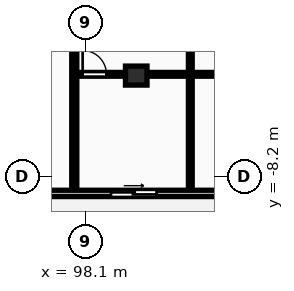
"""IFC4 building model, lengths in metres.
Left out: names, types, materials, properties, quantities, classifications, styles, units other than length and angle.
Written with IfcOpenShell. Run it as: python <this file> out.ifc"""

import sys

from ifc_helpers import new_model, si_unit, direction, frame, frame_2d, origin, origin_2d, place, context, subcontext, project, spatial, rectangle, extrude, element, fill, save


model = new_model("IFC4")
c1 = context("Model", 3, precision=1e-05, world=origin(), true_north=direction((0.0, 1.0)))
c2 = subcontext(c1, "Body", "Model", "MODEL_VIEW")
j1 = project(units=[si_unit("LENGTHUNIT", "METRE"), si_unit("PLANEANGLEUNIT", "RADIAN")], contexts=[c1])
p1 = place(None, origin())
s1 = spatial("IfcSite", under=j1, at=p1, CompositionType="ELEMENT")
p2 = place(p1, origin())
s2 = spatial("IfcBuilding", under=s1, at=p2, CompositionType="ELEMENT")
p3 = place(p2, frame((0.0, 0.0, 126.3)))
s3 = spatial("IfcBuildingStorey", under=s2, at=p3, CompositionType="ELEMENT", Elevation=126.3)
p4 = place(p3, frame((100.1, -4.2, 0.0), z_axis=(0.0, 0.0, 1.0), x_axis=(1.0, 0.0, 0.0)))
e1 = element("IfcColumn", 1, at=p4, inside=s3, PredefinedType="COLUMN", context=c2, shape_type="SweptSolid", body=[
    extrude(rectangle(XDim=0.85, YDim=0.75, at=origin_2d()), origin(), (0.0, 0.0, 1.0), 3.25),
])
p5 = place(p3, frame((72.7, -8.85, 0.0), z_axis=(0.0, 0.0, 1.0), x_axis=(1.0, 0.0, 0.0)))
e2 = element("IfcWall", 2, at=p5, inside=s3, PredefinedType="STANDARD", context=c2, shape_type="SweptSolid", body=[
    extrude(rectangle(XDim=58.0, YDim=0.25, at=frame_2d((29.0, 0.0))), origin(), (0.0, 0.0, 1.0), 2.97),
])
p6 = place(p5, frame((5.77, 0.0, 0.85)))
e3 = element("IfcOpeningElement", 3, at=p6, cuts=e2, PredefinedType="OPENING", context=c2, shape_type="SweptSolid", body=[
    extrude(rectangle(XDim=2.4, YDim=1.9, at=frame_2d((1.2, 0.95))), frame((0.0, 0.135, 0.0), z_axis=(0.0, -1.0, 0.0), x_axis=(1.0, 0.0, 0.0)), (0.0, 0.0, 1.0), 0.27),
])
p7 = place(p5, frame((10.97, 0.0, 0.85)))
e4 = element("IfcOpeningElement", 4, at=p7, cuts=e2, PredefinedType="OPENING", context=c2, shape_type="SweptSolid", body=[
    extrude(rectangle(XDim=2.4, YDim=1.9, at=frame_2d((1.2, 0.95))), frame((0.0, 0.135, 0.0), z_axis=(0.0, -1.0, 0.0), x_axis=(1.0, 0.0, 0.0)), (0.0, 0.0, 1.0), 0.27),
])
p8 = place(p5, frame((16.387, 0.0, 0.85)))
e5 = element("IfcOpeningElement", 5, at=p8, cuts=e2, PredefinedType="OPENING", context=c2, shape_type="SweptSolid", body=[
    extrude(rectangle(XDim=2.4, YDim=1.9, at=frame_2d((1.2, 0.95))), frame((0.0, 0.135, 0.0), z_axis=(0.0, -1.0, 0.0), x_axis=(1.0, 0.0, 0.0)), (0.0, 0.0, 1.0), 0.27),
])
p9 = place(p5, frame((1.345, 0.0, 0.0)))
e6 = element("IfcOpeningElement", 6, at=p9, cuts=e2, PredefinedType="OPENING", context=c2, shape_type="SweptSolid", body=[
    extrude(rectangle(XDim=1.8, YDim=2.2, at=frame_2d((0.9, 1.1))), frame((0.0, 0.135, 0.0), z_axis=(0.0, -1.0, 0.0), x_axis=(1.0, 0.0, 0.0)), (0.0, 0.0, 1.0), 0.27),
])
p10 = place(p5, frame((21.419, 0.0, 0.85)))
e7 = element("IfcOpeningElement", 7, at=p10, cuts=e2, PredefinedType="OPENING", context=c2, shape_type="SweptSolid", body=[
    extrude(rectangle(XDim=2.4, YDim=1.9, at=frame_2d((1.2, 0.95))), frame((0.0, 0.135, 0.0), z_axis=(0.0, -1.0, 0.0), x_axis=(1.0, 0.0, 0.0)), (0.0, 0.0, 1.0), 0.27),
])
p11 = place(p5, frame((30.827, 0.0, 0.85)))
e8 = element("IfcOpeningElement", 8, at=p11, cuts=e2, PredefinedType="OPENING", context=c2, shape_type="SweptSolid", body=[
    extrude(rectangle(XDim=2.4, YDim=1.9, at=frame_2d((1.2, 0.95))), frame((0.0, 0.135, 0.0), z_axis=(0.0, -1.0, 0.0), x_axis=(1.0, 0.0, 0.0)), (0.0, 0.0, 1.0), 0.27),
])
p12 = place(p5, frame((35.688, 0.0, 0.85)))
e9 = element("IfcOpeningElement", 9, at=p12, cuts=e2, PredefinedType="OPENING", context=c2, shape_type="SweptSolid", body=[
    extrude(rectangle(XDim=2.4, YDim=1.9, at=frame_2d((1.2, 0.95))), frame((0.0, 0.135, 0.0), z_axis=(0.0, -1.0, 0.0), x_axis=(1.0, 0.0, 0.0)), (0.0, 0.0, 1.0), 0.27),
])
p13 = place(p5, frame((26.405, 0.0, 0.0)))
e10 = element("IfcOpeningElement", 10, at=p13, cuts=e2, PredefinedType="OPENING", context=c2, shape_type="SweptSolid", body=[
    extrude(rectangle(XDim=1.8, YDim=2.2, at=frame_2d((0.9, 1.1))), frame((0.0, 0.135, 0.0), z_axis=(0.0, -1.0, 0.0), x_axis=(1.0, 0.0, 0.0)), (0.0, 0.0, 1.0), 0.27),
])
p14 = place(p5, frame((40.161, 0.0, 0.85)))
e11 = element("IfcOpeningElement", 11, at=p14, cuts=e2, PredefinedType="OPENING", context=c2, shape_type="SweptSolid", body=[
    extrude(rectangle(XDim=2.4, YDim=1.9, at=frame_2d((1.2, 0.95))), frame((0.0, 0.135, 0.0), z_axis=(0.0, -1.0, 0.0), x_axis=(1.0, 0.0, 0.0)), (0.0, 0.0, 1.0), 0.27),
])
p15 = place(p5, frame((48.113, 0.0, 0.0)))
e12 = element("IfcOpeningElement", 12, at=p15, cuts=e2, PredefinedType="OPENING", context=c2, shape_type="SweptSolid", body=[
    extrude(rectangle(XDim=1.8, YDim=2.2, at=frame_2d((0.9, 1.1))), frame((0.0, 0.135, 0.0), z_axis=(0.0, -1.0, 0.0), x_axis=(1.0, 0.0, 0.0)), (0.0, 0.0, 1.0), 0.27),
])
p16 = place(p5, frame((54.9, 0.0, 0.85)))
e13 = element("IfcOpeningElement", 13, at=p16, cuts=e2, PredefinedType="OPENING", context=c2, shape_type="SweptSolid", body=[
    extrude(rectangle(XDim=2.4, YDim=1.9, at=frame_2d((1.2, 0.95))), frame((0.0, 0.135, 0.0), z_axis=(0.0, -1.0, 0.0), x_axis=(1.0, 0.0, 0.0)), (0.0, 0.0, 1.0), 0.27),
])
p17 = place(p3, frame((97.655, -8.7, 0.0), z_axis=(0.0, 0.0, 1.0), x_axis=(0.0, 1.0, 0.0)))
e14 = element("IfcWall", 14, at=p17, inside=s3, PredefinedType="PARTITIONING", context=c2, shape_type="SweptSolid", body=[
    extrude(rectangle(XDim=24.57, YDim=0.2, at=frame_2d((12.285, 0.0))), origin(), (0.0, 0.0, 1.0), 2.97),
])
p18 = place(p3, frame((102.235, -8.7, 0.0), z_axis=(0.0, 0.0, 1.0), x_axis=(0.0, 1.0, 0.0)))
e15 = element("IfcWall", 15, at=p18, inside=s3, PredefinedType="PARTITIONING", context=c2, shape_type="SweptSolid", body=[
    extrude(rectangle(XDim=9.61, YDim=0.15, at=frame_2d((4.805, 0.0))), origin(), (0.0, 0.0, 1.0), 2.97),
])
p19 = place(p18, frame((5.92, 0.0, 0.0)))
e16 = element("IfcOpeningElement", 16, at=p19, cuts=e15, PredefinedType="OPENING", context=c2, shape_type="SweptSolid", body=[
    extrude(rectangle(XDim=0.92, YDim=2.08, at=frame_2d((0.46, 1.04))), frame((0.0, 0.085, 0.0), z_axis=(0.0, -1.0, 0.0), x_axis=(1.0, 0.0, 0.0)), (0.0, 0.0, 1.0), 0.17),
])
p20 = place(p3, frame((97.735, -4.15, 0.0), z_axis=(0.0, 0.0, 1.0), x_axis=(1.0, 0.0, 0.0)))
e17 = element("IfcWall", 17, at=p20, inside=s3, PredefinedType="PARTITIONING", context=c2, shape_type="SweptSolid", body=[
    extrude(rectangle(XDim=14.222, YDim=0.15, at=frame_2d((7.111, 0.0))), origin(), (0.0, 0.0, 1.0), 2.663),
])
p21 = place(p20, frame((0.25, 0.0, 0.0)))
e18 = element("IfcOpeningElement", 18, at=p21, cuts=e17, PredefinedType="OPENING", context=c2, shape_type="SweptSolid", body=[
    extrude(rectangle(XDim=0.94, YDim=2.1, at=frame_2d((0.47, 1.05))), frame((0.0, 0.085, 0.0), z_axis=(0.0, -1.0, 0.0), x_axis=(1.0, 0.0, 0.0)), (0.0, 0.0, 1.0), 0.17),
])
p22 = place(p20, frame((6.671, 0.0, 0.0)))
e19 = element("IfcOpeningElement", 19, at=p22, cuts=e17, PredefinedType="OPENING", context=c2, shape_type="SweptSolid", body=[
    extrude(rectangle(XDim=0.88, YDim=2.06, at=frame_2d((0.44, 1.03))), frame((0.0, 0.085, 0.0), z_axis=(0.0, -1.0, 0.0), x_axis=(1.0, 0.0, 0.0)), (0.0, 0.0, 1.0), 0.17),
])
p23 = place(p20, frame((12.985, 0.0, 0.0)))
e20 = element("IfcOpeningElement", 20, at=p23, cuts=e17, PredefinedType="OPENING", context=c2, shape_type="SweptSolid", body=[
    extrude(rectangle(XDim=0.88, YDim=2.06, at=frame_2d((0.44, 1.03))), frame((0.0, 0.085, 0.0), z_axis=(0.0, -1.0, 0.0), x_axis=(1.0, 0.0, 0.0)), (0.0, 0.0, 1.0), 0.17),
])
p24 = place(p13, origin())
e21 = element("IfcDoor", 21, at=p24, inside=s3, OperationType="SLIDING_TO_RIGHT", PredefinedType="DOOR", context=c2, shape_type="SweptSolid", body=[
    extrude(rectangle(XDim=1.8, YDim=2.2, at=frame_2d((0.9, 1.1))), frame((0.0, 0.025, 0.0), z_axis=(0.0, -1.0, 0.0), x_axis=(1.0, 0.0, 0.0)), (0.0, 0.0, 1.0), 0.05),
])
fill(e10, e21)
p25 = place(p21, origin())
e22 = element("IfcDoor", 22, at=p25, inside=s3, OperationType="SINGLE_SWING_LEFT", PredefinedType="DOOR", context=c2, shape_type="SweptSolid", body=[
    extrude(rectangle(XDim=0.94, YDim=2.1, at=frame_2d((0.47, 1.05))), frame((0.0, 0.025, 0.0), z_axis=(0.0, -1.0, 0.0), x_axis=(1.0, 0.0, 0.0)), (0.0, 0.0, 1.0), 0.05),
])
fill(e18, e22)
save(model, sys.argv[1])
